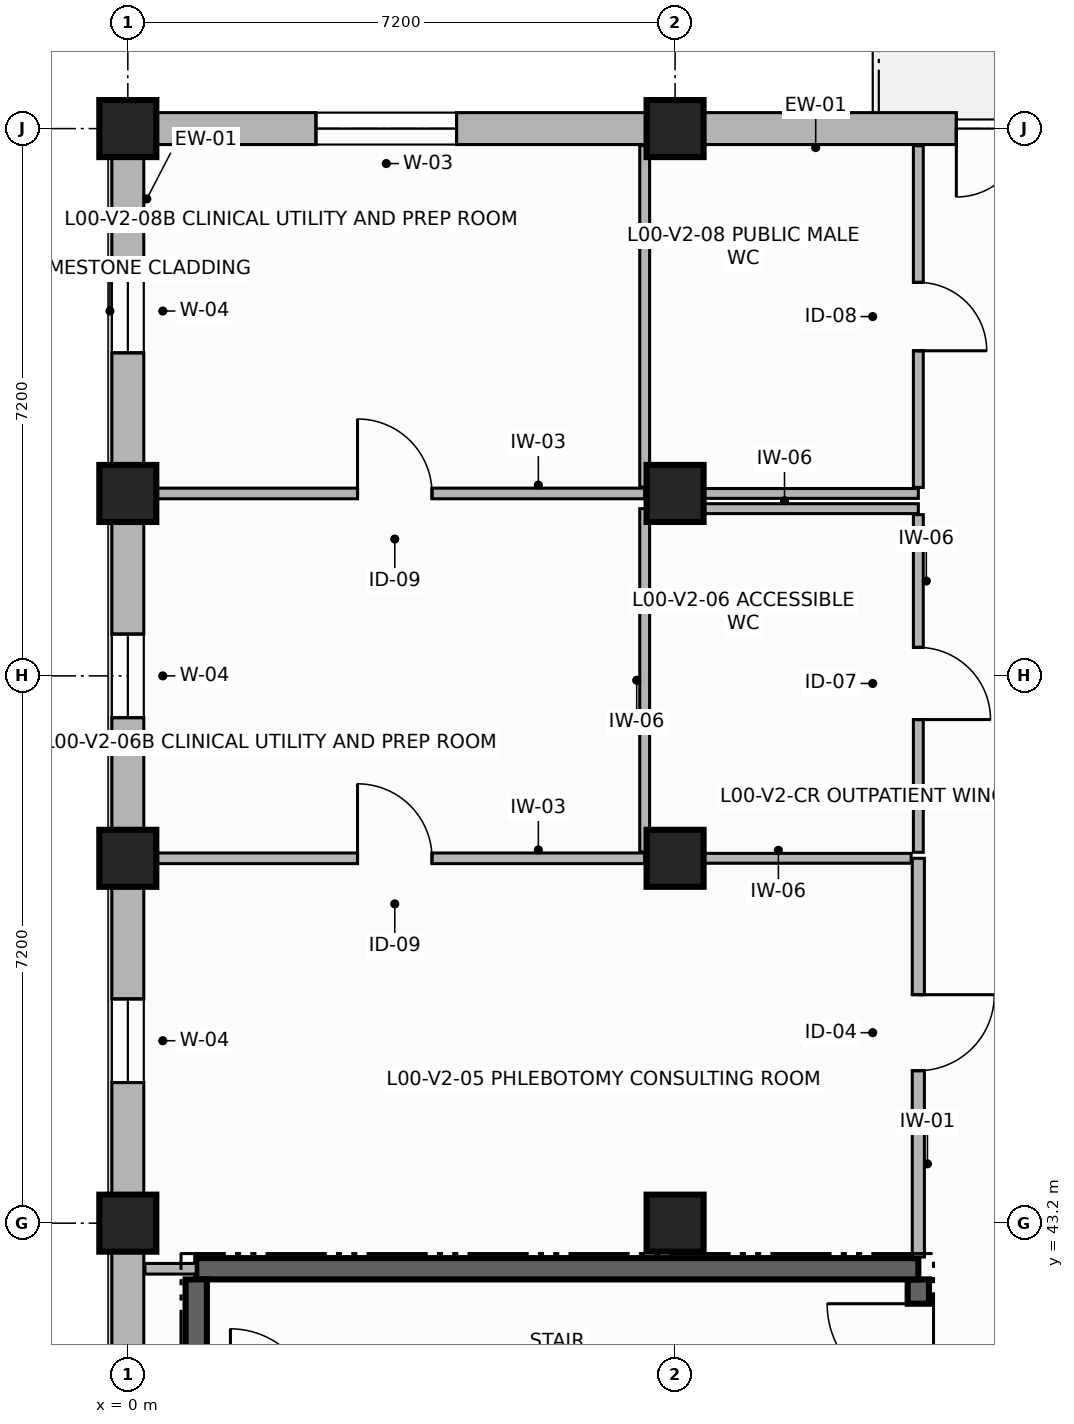
"""IFC4 building model, lengths in metres.
Left out: names, types, materials, properties, quantities, classifications, styles, units other than length and angle.
Written with IfcOpenShell. Run it as: python <this file> out.ifc"""

import sys

from ifc_helpers import new_model, si_unit, direction, frame, frame_2d, origin, origin_2d, place, context, subcontext, project, spatial, rectangle, extrude, element, fill, save


model = new_model("IFC4")
c1 = context("Model", 3, precision=1e-05, world=origin(), true_north=direction((0.0, 1.0)))
c2 = subcontext(c1, "Body", "Model", "MODEL_VIEW")
j1 = project(units=[si_unit("LENGTHUNIT", "METRE"), si_unit("PLANEANGLEUNIT", "RADIAN")], contexts=[c1])
p1 = place(None, origin())
s1 = spatial("IfcSite", under=j1, at=p1, CompositionType="ELEMENT")
p2 = place(p1, origin())
s2 = spatial("IfcBuilding", under=s1, at=p2, CompositionType="ELEMENT")
p3 = place(p2, origin())
s3 = spatial("IfcBuildingStorey", under=s2, at=p3, CompositionType="ELEMENT", Elevation=0.0)
for number, where, z_axis, x_axis in (
    (1, (0.0, 43.2, 0.0), (0.0, 0.0, 1.0), (1.0, 0.0, 0.0)),
    (2, (0.0, 48.0, 0.0), (0.0, 0.0, 1.0), (1.0, 0.0, 0.0)),
    (3, (0.0, 52.8, 0.0), (0.0, 0.0, 1.0), (1.0, 0.0, 0.0)),
    (4, (0.0, 57.6, 0.0), (0.0, 0.0, 1.0), (1.0, 0.0, 0.0)),
    (5, (7.2, 43.2, 0.0), (0.0, 0.0, 1.0), (1.0, 0.0, 0.0)),
    (6, (7.2, 48.0, 0.0), (0.0, 0.0, 1.0), (1.0, 0.0, 0.0)),
    (7, (7.2, 52.8, 0.0), (0.0, 0.0, 1.0), (1.0, 0.0, 0.0)),
    (8, (7.2, 57.6, 0.0), (0.0, 0.0, 1.0), (1.0, 0.0, 0.0)),
):
    element("IfcColumn", number, at=place(p3, frame(where, z_axis=z_axis, x_axis=x_axis)), inside=s3, PredefinedType="COLUMN", context=c2, shape_type="SweptSolid", body=[
        extrude(rectangle(XDim=0.75, YDim=0.75, at=origin_2d()), origin(), (0.0, 0.0, 1.0), 4.22),
    ])
p4 = place(p3, frame((14.4, 57.6, 0.0), z_axis=(0.0, 0.0, 1.0), x_axis=(-1.0, 0.0, 0.0)))
e9 = element("IfcWall", 9, at=p4, inside=s3, PredefinedType="SOLIDWALL", context=c2, shape_type="SweptSolid", body=[
    extrude(rectangle(XDim=7.2, YDim=0.42, at=frame_2d((3.6, 0.0))), origin(), (0.0, 0.0, 1.0), 3.6),
])
p5 = place(p4, frame((1.7, 0.0, 0.0)))
e10 = element("IfcOpeningElement", 10, at=p5, cuts=e9, PredefinedType="OPENING", context=c2, shape_type="SweptSolid", body=[
    extrude(rectangle(XDim=1.8, YDim=2.4, at=frame_2d((0.9, 1.2))), frame((0.0, 0.22, 0.0), z_axis=(0.0, -1.0, 0.0), x_axis=(1.0, 0.0, 0.0)), (0.0, 0.0, 1.0), 0.44),
])
p6 = place(p3, frame((7.2, 57.6, 0.0), z_axis=(0.0, 0.0, 1.0), x_axis=(-1.0, 0.0, 0.0)))
e11 = element("IfcWall", 11, at=p6, inside=s3, PredefinedType="SOLIDWALL", context=c2, shape_type="SweptSolid", body=[
    extrude(rectangle(XDim=7.2, YDim=0.42, at=frame_2d((3.6, 0.0))), origin(), (0.0, 0.0, 1.0), 3.6),
])
p7 = place(p6, frame((2.875, 0.0, 0.85)))
e12 = element("IfcOpeningElement", 12, at=p7, cuts=e11, PredefinedType="OPENING", context=c2, shape_type="SweptSolid", body=[
    extrude(rectangle(XDim=1.85, YDim=2.4, at=frame_2d((0.925, 1.2))), frame((0.0, 0.22, 0.0), z_axis=(0.0, -1.0, 0.0), x_axis=(1.0, 0.0, 0.0)), (0.0, 0.0, 1.0), 0.44),
])
p8 = place(p3, frame((0.0, 57.6, 0.0), z_axis=(0.0, 0.0, 1.0), x_axis=(0.0, -1.0, 0.0)))
e13 = element("IfcWall", 13, at=p8, inside=s3, PredefinedType="SOLIDWALL", context=c2, shape_type="SweptSolid", body=[
    extrude(rectangle(XDim=4.8, YDim=0.42, at=frame_2d((2.4, 0.0))), origin(), (0.0, 0.0, 1.0), 3.6),
])
p9 = place(p8, frame((1.85, 0.0, 0.85)))
e14 = element("IfcOpeningElement", 14, at=p9, cuts=e13, PredefinedType="OPENING", context=c2, shape_type="SweptSolid", body=[
    extrude(rectangle(XDim=1.1, YDim=2.35, at=frame_2d((0.55, 1.175))), frame((0.0, 0.22, 0.0), z_axis=(0.0, -1.0, 0.0), x_axis=(1.0, 0.0, 0.0)), (0.0, 0.0, 1.0), 0.44),
])
p10 = place(p3, frame((0.0, 52.8, 0.0), z_axis=(0.0, 0.0, 1.0), x_axis=(0.0, -1.0, 0.0)))
e15 = element("IfcWall", 15, at=p10, inside=s3, PredefinedType="SOLIDWALL", context=c2, shape_type="SweptSolid", body=[
    extrude(rectangle(XDim=4.8, YDim=0.42, at=frame_2d((2.4, 0.0))), origin(), (0.0, 0.0, 1.0), 3.6),
])
p11 = place(p10, frame((1.85, 0.0, 0.85)))
e16 = element("IfcOpeningElement", 16, at=p11, cuts=e15, PredefinedType="OPENING", context=c2, shape_type="SweptSolid", body=[
    extrude(rectangle(XDim=1.1, YDim=2.35, at=frame_2d((0.55, 1.175))), frame((0.0, 0.22, 0.0), z_axis=(0.0, -1.0, 0.0), x_axis=(1.0, 0.0, 0.0)), (0.0, 0.0, 1.0), 0.44),
])
p12 = place(p3, frame((0.0, 48.0, 0.0), z_axis=(0.0, 0.0, 1.0), x_axis=(0.0, -1.0, 0.0)))
e17 = element("IfcWall", 17, at=p12, inside=s3, PredefinedType="SOLIDWALL", context=c2, shape_type="SweptSolid", body=[
    extrude(rectangle(XDim=4.8, YDim=0.42, at=frame_2d((2.4, 0.0))), origin(), (0.0, 0.0, 1.0), 3.6),
])
p13 = place(p12, frame((1.85, 0.0, 0.85)))
e18 = element("IfcOpeningElement", 18, at=p13, cuts=e17, PredefinedType="OPENING", context=c2, shape_type="SweptSolid", body=[
    extrude(rectangle(XDim=1.1, YDim=2.35, at=frame_2d((0.55, 1.175))), frame((0.0, 0.22, 0.0), z_axis=(0.0, -1.0, 0.0), x_axis=(1.0, 0.0, 0.0)), (0.0, 0.0, 1.0), 0.44),
])
p14 = place(p3, frame((0.0, 43.2, 0.0), z_axis=(0.0, 0.0, 1.0), x_axis=(0.0, -1.0, 0.0)))
e19 = element("IfcWall", 19, at=p14, inside=s3, PredefinedType="SOLIDWALL", context=c2, shape_type="SweptSolid", body=[
    extrude(rectangle(XDim=7.2, YDim=0.42, at=frame_2d((3.6, 0.0))), origin(), (0.0, 0.0, 1.0), 3.6),
])
p15 = place(p14, frame((2.75, 0.0, 0.85)))
e20 = element("IfcOpeningElement", 20, at=p15, cuts=e19, PredefinedType="OPENING", context=c2, shape_type="SweptSolid", body=[
    extrude(rectangle(XDim=1.5, YDim=2.5, at=frame_2d((0.75, 1.25))), frame((0.0, 0.22, 0.0), z_axis=(0.0, -1.0, 0.0), x_axis=(1.0, 0.0, 0.0)), (0.0, 0.0, 1.0), 0.44),
])
p16 = place(p3, frame((10.4, 36.94, 0.0), z_axis=(0.0, 0.0, 1.0), x_axis=(0.0, 1.0, 0.0)))
e21 = element("IfcWall", 21, at=p16, inside=s3, PredefinedType="SHEAR", context=c2, shape_type="SweptSolid", body=[
    extrude(rectangle(XDim=5.52, YDim=0.28, at=frame_2d((2.76, 0.0))), origin(), (0.0, 0.0, 1.0), 4.22),
])
p17 = place(p16, frame((4.0, 0.0, 0.0)))
e22 = element("IfcOpeningElement", 22, at=p17, cuts=e21, PredefinedType="OPENING", context=c2, shape_type="SweptSolid", body=[
    extrude(rectangle(XDim=1.2, YDim=2.25, at=frame_2d((0.6, 1.125))), frame((0.0, 0.15, 0.0), z_axis=(0.0, -1.0, 0.0), x_axis=(1.0, 0.0, 0.0)), (0.0, 0.0, 1.0), 0.3),
])
p18 = place(p3, frame((10.4, 42.6, 0.0), z_axis=(0.0, 0.0, 1.0), x_axis=(-1.0, 0.0, 0.0)))
e23 = element("IfcWall", 23, at=p18, inside=s3, PredefinedType="SHEAR", context=c2, shape_type="SweptSolid", body=[
    extrude(rectangle(XDim=9.5, YDim=0.28, at=frame_2d((4.75, 0.0))), origin(), (0.0, 0.0, 1.0), 4.22),
])
p19 = place(p3, frame((0.9, 42.46, 0.0), z_axis=(0.0, 0.0, 1.0), x_axis=(0.0, -1.0, 0.0)))
e24 = element("IfcWall", 24, at=p19, inside=s3, PredefinedType="SHEAR", context=c2, shape_type="SweptSolid", body=[
    extrude(rectangle(XDim=5.52, YDim=0.28, at=frame_2d((2.76, 0.0))), origin(), (0.0, 0.0, 1.0), 4.22),
])
p20 = place(p3, frame((10.4, 48.0, 0.0), z_axis=(0.0, 0.0, 1.0), x_axis=(0.0, -1.0, 0.0)))
e25 = element("IfcWall", 25, at=p20, inside=s3, PredefinedType="PARTITIONING", context=c2, shape_type="SweptSolid", body=[
    extrude(rectangle(XDim=5.245, YDim=0.16, at=frame_2d((2.623, 0.0))), origin(), (0.0, 0.0, 1.0), 3.58),
])
p21 = place(p20, frame((1.794, 0.0, 0.0)))
e26 = element("IfcOpeningElement", 26, at=p21, cuts=e25, PredefinedType="OPENING", context=c2, shape_type="SweptSolid", body=[
    extrude(rectangle(XDim=1.0, YDim=2.15, at=frame_2d((0.5, 1.075))), frame((0.0, 0.09, 0.0), z_axis=(0.0, -1.0, 0.0), x_axis=(1.0, 0.0, 0.0)), (0.0, 0.0, 1.0), 0.18),
])
p22 = place(p3, frame((0.9, 42.6, 0.0), z_axis=(0.0, 0.0, 1.0), x_axis=(-1.0, 0.0, 0.0)))
e27 = element("IfcWall", 27, at=p22, inside=s3, PredefinedType="PARTITIONING", context=c2, shape_type="SweptSolid", body=[
    extrude(rectangle(XDim=0.675, YDim=0.14, at=frame_2d((0.337, 0.0))), origin(), (0.0, 0.0, 1.0), 3.58),
])
p23 = place(p3, frame((0.225, 48.0, 0.0), z_axis=(0.0, 0.0, 1.0), x_axis=(1.0, 0.0, 0.0)))
e28 = element("IfcWall", 28, at=p23, inside=s3, PredefinedType="PARTITIONING", context=c2, shape_type="SweptSolid", body=[
    extrude(rectangle(XDim=6.575, YDim=0.14, at=frame_2d((3.288, 0.0))), origin(), (0.0, 0.0, 1.0), 3.58),
])
p24 = place(p23, frame((2.797, 0.0, 0.0)))
e29 = element("IfcOpeningElement", 29, at=p24, cuts=e28, PredefinedType="OPENING", context=c2, shape_type="SweptSolid", body=[
    extrude(rectangle(XDim=0.98, YDim=2.15, at=frame_2d((0.49, 1.075))), frame((0.0, 0.08, 0.0), z_axis=(0.0, -1.0, 0.0), x_axis=(1.0, 0.0, 0.0)), (0.0, 0.0, 1.0), 0.16),
])
p25 = place(p3, frame((6.812, 48.0, 0.0), z_axis=(0.0, 0.0, 1.0), x_axis=(1.0, 0.0, 0.0)))
e30 = element("IfcWall", 30, at=p25, inside=s3, PredefinedType="PARTITIONING", context=c2, shape_type="SweptSolid", body=[
    extrude(rectangle(XDim=3.494, YDim=0.13, at=frame_2d((1.747, 0.0))), origin(), (0.0, 0.0, 1.0), 3.58),
])
p26 = place(p3, frame((6.8, 48.084, 0.0), z_axis=(0.0, 0.0, 1.0), x_axis=(0.0, 1.0, 0.0)))
e31 = element("IfcWall", 31, at=p26, inside=s3, PredefinedType="PARTITIONING", context=c2, shape_type="SweptSolid", body=[
    extrude(rectangle(XDim=4.516, YDim=0.13, at=frame_2d((2.258, 0.0))), origin(), (0.0, 0.0, 1.0), 3.58),
])
p27 = place(p3, frame((6.879, 52.6, 0.0), z_axis=(0.0, 0.0, 1.0), x_axis=(1.0, 0.0, 0.0)))
e32 = element("IfcWall", 32, at=p27, inside=s3, PredefinedType="PARTITIONING", context=c2, shape_type="SweptSolid", body=[
    extrude(rectangle(XDim=3.521, YDim=0.13, at=frame_2d((1.76, 0.0))), origin(), (0.0, 0.0, 1.0), 3.58),
])
p28 = place(p3, frame((10.4, 52.521, 0.0), z_axis=(0.0, 0.0, 1.0), x_axis=(0.0, -1.0, 0.0)))
e33 = element("IfcWall", 33, at=p28, inside=s3, PredefinedType="PARTITIONING", context=c2, shape_type="SweptSolid", body=[
    extrude(rectangle(XDim=4.442, YDim=0.13, at=frame_2d((2.221, 0.0))), origin(), (0.0, 0.0, 1.0), 3.58),
])
p29 = place(p28, frame((1.746, 0.0, 0.0)))
e34 = element("IfcOpeningElement", 34, at=p29, cuts=e33, PredefinedType="OPENING", context=c2, shape_type="SweptSolid", body=[
    extrude(rectangle(XDim=0.95, YDim=2.1, at=frame_2d((0.475, 1.05))), frame((0.0, 0.075, 0.0), z_axis=(0.0, -1.0, 0.0), x_axis=(1.0, 0.0, 0.0)), (0.0, 0.0, 1.0), 0.15),
])
p30 = place(p3, frame((0.225, 52.8, 0.0), z_axis=(0.0, 0.0, 1.0), x_axis=(1.0, 0.0, 0.0)))
e35 = element("IfcWall", 35, at=p30, inside=s3, PredefinedType="PARTITIONING", context=c2, shape_type="SweptSolid", body=[
    extrude(rectangle(XDim=6.575, YDim=0.14, at=frame_2d((3.288, 0.0))), origin(), (0.0, 0.0, 1.0), 3.58),
])
p31 = place(p30, frame((2.797, 0.0, 0.0)))
e36 = element("IfcOpeningElement", 36, at=p31, cuts=e35, PredefinedType="OPENING", context=c2, shape_type="SweptSolid", body=[
    extrude(rectangle(XDim=0.98, YDim=2.15, at=frame_2d((0.49, 1.075))), frame((0.0, 0.08, 0.0), z_axis=(0.0, -1.0, 0.0), x_axis=(1.0, 0.0, 0.0)), (0.0, 0.0, 1.0), 0.16),
])
p32 = place(p3, frame((6.812, 52.8, 0.0), z_axis=(0.0, 0.0, 1.0), x_axis=(1.0, 0.0, 0.0)))
e37 = element("IfcWall", 37, at=p32, inside=s3, PredefinedType="PARTITIONING", context=c2, shape_type="SweptSolid", body=[
    extrude(rectangle(XDim=3.588, YDim=0.13, at=frame_2d((1.794, 0.0))), origin(), (0.0, 0.0, 1.0), 3.58),
])
p33 = place(p3, frame((6.8, 52.884, 0.0), z_axis=(0.0, 0.0, 1.0), x_axis=(0.0, 1.0, 0.0)))
e38 = element("IfcWall", 38, at=p33, inside=s3, PredefinedType="PARTITIONING", context=c2, shape_type="SweptSolid", body=[
    extrude(rectangle(XDim=4.491, YDim=0.13, at=frame_2d((2.246, 0.0))), origin(), (0.0, 0.0, 1.0), 3.58),
])
p34 = place(p3, frame((10.4, 57.375, 0.0), z_axis=(0.0, 0.0, 1.0), x_axis=(0.0, -1.0, 0.0)))
e39 = element("IfcWall", 39, at=p34, inside=s3, PredefinedType="PARTITIONING", context=c2, shape_type="SweptSolid", body=[
    extrude(rectangle(XDim=4.496, YDim=0.13, at=frame_2d((2.248, 0.0))), origin(), (0.0, 0.0, 1.0), 3.58),
])
p35 = place(p34, frame((1.798, 0.0, 0.0)))
e40 = element("IfcOpeningElement", 40, at=p35, cuts=e39, PredefinedType="OPENING", context=c2, shape_type="SweptSolid", body=[
    extrude(rectangle(XDim=0.9, YDim=2.1, at=frame_2d((0.45, 1.05))), frame((0.0, 0.075, 0.0), z_axis=(0.0, -1.0, 0.0), x_axis=(1.0, 0.0, 0.0)), (0.0, 0.0, 1.0), 0.15),
])
p36 = place(p5, origin())
e41 = element("IfcDoor", 41, at=p36, inside=s3, OperationType="DOUBLE_DOOR_SINGLE_SWING", PredefinedType="DOOR", context=c2, shape_type="SweptSolid", body=[
    extrude(rectangle(XDim=1.8, YDim=2.4, at=frame_2d((0.9, 1.2))), frame((0.0, 0.025, 0.0), z_axis=(0.0, -1.0, 0.0), x_axis=(1.0, 0.0, 0.0)), (0.0, 0.0, 1.0), 0.05),
])
fill(e10, e41)
p37 = place(p7, origin())
e42 = element("IfcWindow", 42, at=p37, inside=s3, PartitioningType="SINGLE_PANEL", PredefinedType="WINDOW", context=c2, shape_type="SweptSolid", body=[
    extrude(rectangle(XDim=1.85, YDim=2.4, at=frame_2d((0.925, 1.2))), frame((0.0, 0.03, 0.0), z_axis=(0.0, -1.0, 0.0), x_axis=(1.0, 0.0, 0.0)), (0.0, 0.0, 1.0), 0.06),
])
fill(e12, e42)
p38 = place(p9, origin())
e43 = element("IfcWindow", 43, at=p38, inside=s3, PartitioningType="SINGLE_PANEL", PredefinedType="WINDOW", context=c2, shape_type="SweptSolid", body=[
    extrude(rectangle(XDim=1.1, YDim=2.35, at=frame_2d((0.55, 1.175))), frame((0.0, 0.03, 0.0), z_axis=(0.0, -1.0, 0.0), x_axis=(1.0, 0.0, 0.0)), (0.0, 0.0, 1.0), 0.06),
])
fill(e14, e43)
p39 = place(p11, origin())
e44 = element("IfcWindow", 44, at=p39, inside=s3, PartitioningType="SINGLE_PANEL", PredefinedType="WINDOW", context=c2, shape_type="SweptSolid", body=[
    extrude(rectangle(XDim=1.1, YDim=2.35, at=frame_2d((0.55, 1.175))), frame((0.0, 0.03, 0.0), z_axis=(0.0, -1.0, 0.0), x_axis=(1.0, 0.0, 0.0)), (0.0, 0.0, 1.0), 0.06),
])
fill(e16, e44)
p40 = place(p13, origin())
e45 = element("IfcWindow", 45, at=p40, inside=s3, PartitioningType="SINGLE_PANEL", PredefinedType="WINDOW", context=c2, shape_type="SweptSolid", body=[
    extrude(rectangle(XDim=1.1, YDim=2.35, at=frame_2d((0.55, 1.175))), frame((0.0, 0.03, 0.0), z_axis=(0.0, -1.0, 0.0), x_axis=(1.0, 0.0, 0.0)), (0.0, 0.0, 1.0), 0.06),
])
fill(e18, e45)
p41 = place(p17, origin())
e46 = element("IfcDoor", 46, at=p41, inside=s3, OperationType="SINGLE_SWING_RIGHT", PredefinedType="DOOR", context=c2, shape_type="SweptSolid", body=[
    extrude(rectangle(XDim=1.2, YDim=2.25, at=frame_2d((0.6, 1.125))), frame((0.0, 0.025, 0.0), z_axis=(0.0, -1.0, 0.0), x_axis=(1.0, 0.0, 0.0)), (0.0, 0.0, 1.0), 0.05),
])
fill(e22, e46)
p42 = place(p21, origin())
e47 = element("IfcDoor", 47, at=p42, inside=s3, OperationType="SINGLE_SWING_LEFT", PredefinedType="DOOR", context=c2, shape_type="SweptSolid", body=[
    extrude(rectangle(XDim=1.0, YDim=2.15, at=frame_2d((0.5, 1.075))), frame((0.0, 0.025, 0.0), z_axis=(0.0, -1.0, 0.0), x_axis=(1.0, 0.0, 0.0)), (0.0, 0.0, 1.0), 0.05),
])
fill(e26, e47)
p43 = place(p29, origin())
e48 = element("IfcDoor", 48, at=p43, inside=s3, OperationType="SINGLE_SWING_RIGHT", PredefinedType="DOOR", context=c2, shape_type="SweptSolid", body=[
    extrude(rectangle(XDim=0.95, YDim=2.1, at=frame_2d((0.475, 1.05))), frame((0.0, 0.025, 0.0), z_axis=(0.0, -1.0, 0.0), x_axis=(1.0, 0.0, 0.0)), (0.0, 0.0, 1.0), 0.05),
])
fill(e34, e48)
p44 = place(p24, origin())
e49 = element("IfcDoor", 49, at=p44, inside=s3, OperationType="SINGLE_SWING_LEFT", PredefinedType="DOOR", context=c2, shape_type="SweptSolid", body=[
    extrude(rectangle(XDim=0.98, YDim=2.15, at=frame_2d((0.49, 1.075))), frame((0.0, 0.025, 0.0), z_axis=(0.0, -1.0, 0.0), x_axis=(1.0, 0.0, 0.0)), (0.0, 0.0, 1.0), 0.05),
])
fill(e29, e49)
p45 = place(p35, origin())
e50 = element("IfcDoor", 50, at=p45, inside=s3, OperationType="SINGLE_SWING_RIGHT", PredefinedType="DOOR", context=c2, shape_type="SweptSolid", body=[
    extrude(rectangle(XDim=0.9, YDim=2.1, at=frame_2d((0.45, 1.05))), frame((0.0, 0.025, 0.0), z_axis=(0.0, -1.0, 0.0), x_axis=(1.0, 0.0, 0.0)), (0.0, 0.0, 1.0), 0.05),
])
fill(e40, e50)
p46 = place(p31, origin())
e51 = element("IfcDoor", 51, at=p46, inside=s3, OperationType="SINGLE_SWING_LEFT", PredefinedType="DOOR", context=c2, shape_type="SweptSolid", body=[
    extrude(rectangle(XDim=0.98, YDim=2.15, at=frame_2d((0.49, 1.075))), frame((0.0, 0.025, 0.0), z_axis=(0.0, -1.0, 0.0), x_axis=(1.0, 0.0, 0.0)), (0.0, 0.0, 1.0), 0.05),
])
fill(e36, e51)
save(model, sys.argv[1])
